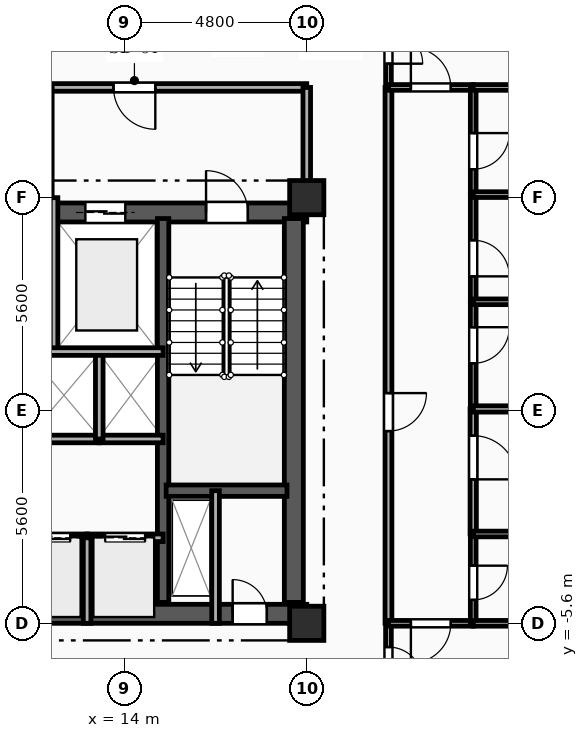
"""IFC4 building model, lengths in metres.
Left out: names, types, materials, properties, quantities, classifications, styles, units other than length and angle.
Written with IfcOpenShell. Run it as: python <this file> out.ifc"""

import sys

from ifc_helpers import new_model, si_unit, direction, frame, frame_2d, origin, origin_2d, place, context, subcontext, project, spatial, rectangle, extrude, element, fill, save


model = new_model("IFC4")
c1 = context("Model", 3, precision=1e-05, world=origin(), true_north=direction((0.0, 1.0)))
c2 = subcontext(c1, "Body", "Model", "MODEL_VIEW")
j1 = project(units=[si_unit("LENGTHUNIT", "METRE"), si_unit("PLANEANGLEUNIT", "RADIAN")], contexts=[c1])
p1 = place(None, origin())
s1 = spatial("IfcSite", under=j1, at=p1, CompositionType="ELEMENT")
p2 = place(p1, origin())
s2 = spatial("IfcBuilding", under=s1, at=p2, CompositionType="ELEMENT")
p3 = place(p2, frame((0.0, 0.0, 141.05)))
s3 = spatial("IfcBuildingStorey", under=s2, at=p3, CompositionType="ELEMENT", Elevation=141.05)
for number, where, z_axis, x_axis in (
    (1, (18.8, -5.6, 0.0), (0.0, 0.0, 1.0), (1.0, 0.0, 0.0)),
    (2, (18.8, 5.6, 0.0), (0.0, 0.0, 1.0), (1.0, 0.0, 0.0)),
):
    element("IfcColumn", number, at=place(p3, frame(where, z_axis=z_axis, x_axis=x_axis)), inside=s3, PredefinedType="COLUMN", context=c2, shape_type="SweptSolid", body=[
        extrude(rectangle(XDim=0.9, YDim=0.9, at=origin_2d()), origin(), (0.0, 0.0, 1.0), 3.35),
    ])
p4 = place(p3, frame((9.2, 5.21, 0.0), z_axis=(0.0, 0.0, 1.0), x_axis=(1.0, 0.0, 0.0)))
e3 = element("IfcWall", 3, at=p4, inside=s3, PredefinedType="SHEAR", context=c2, shape_type="SweptSolid", body=[
    extrude(rectangle(XDim=9.6, YDim=0.5, at=frame_2d((4.8, 0.0))), origin(), (0.0, 0.0, 1.0), 3.04),
])
p5 = place(p4, frame((6.95, 0.0, 0.0)))
e4 = element("IfcOpeningElement", 4, at=p5, cuts=e3, PredefinedType="OPENING", context=c2, shape_type="SweptSolid", body=[
    extrude(rectangle(XDim=1.1, YDim=2.15, at=frame_2d((0.55, 1.075))), frame((0.0, 0.26, 0.0), z_axis=(0.0, -1.0, 0.0), x_axis=(1.0, 0.0, 0.0)), (0.0, 0.0, 1.0), 0.52),
])
p6 = place(p4, frame((3.775, 0.0, 0.0)))
e5 = element("IfcOpeningElement", 5, at=p6, cuts=e3, PredefinedType="OPENING", context=c2, shape_type="SweptSolid", body=[
    extrude(rectangle(XDim=1.05, YDim=2.1, at=frame_2d((0.525, 1.05))), frame((0.0, 0.26, 0.0), z_axis=(0.0, -1.0, 0.0), x_axis=(1.0, 0.0, 0.0)), (0.0, 0.0, 1.0), 0.52),
])
p7 = place(p3, frame((9.2, -5.35, 0.0), z_axis=(0.0, 0.0, 1.0), x_axis=(1.0, 0.0, 0.0)))
e6 = element("IfcWall", 6, at=p7, inside=s3, PredefinedType="SHEAR", context=c2, shape_type="SweptSolid", body=[
    extrude(rectangle(XDim=9.6, YDim=0.5, at=frame_2d((4.8, 0.0))), origin(), (0.0, 0.0, 1.0), 3.04),
])
p8 = place(p7, frame((7.65, 0.0, 0.0)))
e7 = element("IfcOpeningElement", 7, at=p8, cuts=e6, PredefinedType="OPENING", context=c2, shape_type="SweptSolid", body=[
    extrude(rectangle(XDim=0.9, YDim=2.1, at=frame_2d((0.45, 1.05))), frame((0.0, 0.26, 0.0), z_axis=(0.0, -1.0, 0.0), x_axis=(1.0, 0.0, 0.0)), (0.0, 0.0, 1.0), 0.52),
])
p9 = place(p3, frame((18.46, -5.05, 0.0), z_axis=(0.0, 0.0, 1.0), x_axis=(0.0, 1.0, 0.0)))
e8 = element("IfcWall", 8, at=p9, inside=s3, PredefinedType="SHEAR", context=c2, shape_type="SweptSolid", body=[
    extrude(rectangle(XDim=10.1, YDim=0.5, at=frame_2d((5.05, 0.0))), origin(), (0.0, 0.0, 1.0), 3.04),
])
p10 = place(p3, frame((15.02, -5.05, 0.0), z_axis=(0.0, 0.0, 1.0), x_axis=(0.0, 1.0, 0.0)))
e9 = element("IfcWall", 9, at=p10, inside=s3, PredefinedType="SHEAR", context=c2, shape_type="SweptSolid", body=[
    extrude(rectangle(XDim=10.1, YDim=0.3, at=frame_2d((5.05, 0.0))), origin(), (0.0, 0.0, 1.0), 3.04),
])
p11 = place(p3, frame((15.1, -2.11, 0.0), z_axis=(0.0, 0.0, 1.0), x_axis=(1.0, 0.0, 0.0)))
e10 = element("IfcWall", 10, at=p11, inside=s3, PredefinedType="SHEAR", context=c2, shape_type="SweptSolid", body=[
    extrude(rectangle(XDim=3.18, YDim=0.3, at=frame_2d((1.59, 0.0))), origin(), (0.0, 0.0, 1.0), 3.04),
])
p12 = place(p3, frame((16.4, -2.11, 0.0), z_axis=(0.0, 0.0, 1.0), x_axis=(0.0, -1.0, 0.0)))
e11 = element("IfcWall", 11, at=p12, inside=s3, PredefinedType="PARTITIONING", context=c2, shape_type="SweptSolid", body=[
    extrude(rectangle(XDim=3.49, YDim=0.2, at=frame_2d((1.745, 0.0))), origin(), (0.0, 0.0, 1.0), 3.04),
])
p13 = place(p3, frame((12.15, 5.6, 0.0), z_axis=(0.0, 0.0, 1.0), x_axis=(0.0, -1.0, 0.0)))
e12 = element("IfcWall", 12, at=p13, inside=s3, PredefinedType="PARTITIONING", context=c2, shape_type="SweptSolid", body=[
    extrude(rectangle(XDim=4.05, YDim=0.2, at=frame_2d((2.025, 0.0))), origin(), (0.0, 0.0, 1.0), 3.04),
])
p14 = place(p3, frame((18.8, 8.5, 0.0), z_axis=(0.0, 0.0, 1.0), x_axis=(-1.0, 0.0, 0.0)))
e13 = element("IfcWall", 13, at=p14, inside=s3, PredefinedType="PARTITIONING", context=c2, shape_type="SweptSolid", body=[
    extrude(rectangle(XDim=6.8, YDim=0.2, at=frame_2d((3.4, 0.0))), origin(), (0.0, 0.0, 1.0), 3.04),
])
p15 = place(p14, frame((3.985, 0.0, 0.0)))
e14 = element("IfcOpeningElement", 14, at=p15, cuts=e13, PredefinedType="OPENING", context=c2, shape_type="SweptSolid", body=[
    extrude(rectangle(XDim=1.1, YDim=2.15, at=frame_2d((0.55, 1.075))), frame((0.0, 0.11, 0.0), z_axis=(0.0, -1.0, 0.0), x_axis=(1.0, 0.0, 0.0)), (0.0, 0.0, 1.0), 0.22),
])
p16 = place(p3, frame((18.8, 5.6, 0.0), z_axis=(0.0, 0.0, 1.0), x_axis=(0.0, 1.0, 0.0)))
e15 = element("IfcWall", 15, at=p16, inside=s3, PredefinedType="PARTITIONING", context=c2, shape_type="SweptSolid", body=[
    extrude(rectangle(XDim=2.9, YDim=0.2, at=frame_2d((1.45, 0.0))), origin(), (0.0, 0.0, 1.0), 2.525),
])
p17 = place(p3, frame((12.0, 8.5, 0.0), z_axis=(0.0, 0.0, 1.0), x_axis=(0.0, -1.0, 0.0)))
e16 = element("IfcWall", 16, at=p17, inside=s3, PredefinedType="PARTITIONING", context=c2, shape_type="SweptSolid", body=[
    extrude(rectangle(XDim=2.9, YDim=0.2, at=frame_2d((1.45, 0.0))), origin(), (0.0, 0.0, 1.0), 3.04),
])
p18 = place(p3, frame((11.08, -3.35, 0.0), z_axis=(0.0, 0.0, 1.0), x_axis=(1.0, 0.0, 0.0)))
e17 = element("IfcWall", 17, at=p18, inside=s3, PredefinedType="PARTITIONING", context=c2, shape_type="SweptSolid", body=[
    extrude(rectangle(XDim=1.94, YDim=0.2, at=frame_2d((0.97, 0.0))), origin(), (0.0, 0.0, 1.0), 3.04),
])
p19 = place(p18, frame((0.445, 0.0, 0.0)))
e18 = element("IfcOpeningElement", 18, at=p19, cuts=e17, PredefinedType="OPENING", context=c2, shape_type="SweptSolid", body=[
    extrude(rectangle(XDim=1.05, YDim=2.1, at=frame_2d((0.525, 1.05))), frame((0.0, 0.11, 0.0), z_axis=(0.0, -1.0, 0.0), x_axis=(1.0, 0.0, 0.0)), (0.0, 0.0, 1.0), 0.22),
])
p20 = place(p3, frame((13.02, -3.35, 0.0), z_axis=(0.0, 0.0, 1.0), x_axis=(1.0, 0.0, 0.0)))
e19 = element("IfcWall", 19, at=p20, inside=s3, PredefinedType="PARTITIONING", context=c2, shape_type="SweptSolid", body=[
    extrude(rectangle(XDim=2.0, YDim=0.2, at=frame_2d((1.0, 0.0))), origin(), (0.0, 0.0, 1.0), 3.04),
])
p21 = place(p20, frame((0.475, 0.0, 0.0)))
e20 = element("IfcOpeningElement", 20, at=p21, cuts=e19, PredefinedType="OPENING", context=c2, shape_type="SweptSolid", body=[
    extrude(rectangle(XDim=1.05, YDim=2.1, at=frame_2d((0.525, 1.05))), frame((0.0, 0.11, 0.0), z_axis=(0.0, -1.0, 0.0), x_axis=(1.0, 0.0, 0.0)), (0.0, 0.0, 1.0), 0.22),
])
p22 = place(p3, frame((13.34, -0.75, 0.0), z_axis=(0.0, 0.0, 1.0), x_axis=(-1.0, 0.0, 0.0)))
e21 = element("IfcWall", 21, at=p22, inside=s3, PredefinedType="PARTITIONING", context=c2, shape_type="SweptSolid", body=[
    extrude(rectangle(XDim=1.88, YDim=0.2, at=frame_2d((0.94, 0.0))), origin(), (0.0, 0.0, 1.0), 3.04),
])
p23 = place(p3, frame((15.02, -0.75, 0.0), z_axis=(0.0, 0.0, 1.0), x_axis=(-1.0, 0.0, 0.0)))
e22 = element("IfcWall", 22, at=p23, inside=s3, PredefinedType="PARTITIONING", context=c2, shape_type="SweptSolid", body=[
    extrude(rectangle(XDim=1.68, YDim=0.2, at=frame_2d((0.84, 0.0))), origin(), (0.0, 0.0, 1.0), 3.04),
])
p24 = place(p3, frame((13.02, -5.6, 0.0), z_axis=(0.0, 0.0, 1.0), x_axis=(0.0, 1.0, 0.0)))
e23 = element("IfcWall", 23, at=p24, inside=s3, PredefinedType="PARTITIONING", context=c2, shape_type="SweptSolid", body=[
    extrude(rectangle(XDim=2.25, YDim=0.2, at=frame_2d((1.125, 0.0))), origin(), (0.0, 0.0, 1.0), 3.04),
])
p25 = place(p3, frame((13.34, -0.75, 0.0), z_axis=(0.0, 0.0, 1.0), x_axis=(0.0, 1.0, 0.0)))
e24 = element("IfcWall", 24, at=p25, inside=s3, PredefinedType="PARTITIONING", context=c2, shape_type="SweptSolid", body=[
    extrude(rectangle(XDim=2.3, YDim=0.2, at=frame_2d((1.15, 0.0))), origin(), (0.0, 0.0, 1.0), 3.04),
])
p26 = place(p3, frame((20.95, 10.65, 0.0), z_axis=(0.0, 0.0, 1.0), x_axis=(0.0, -1.0, 0.0)))
e25 = element("IfcWall", 25, at=p26, inside=s3, PredefinedType="PARTITIONING", context=c2, shape_type="SweptSolid", body=[
    extrude(rectangle(XDim=2.15, YDim=0.15, at=frame_2d((1.075, 0.0))), origin(), (0.0, 0.0, 1.0), 3.04),
])
p27 = place(p26, frame((0.625, 0.0, 0.0)))
e26 = element("IfcOpeningElement", 26, at=p27, cuts=e25, PredefinedType="OPENING", context=c2, shape_type="SweptSolid", body=[
    extrude(rectangle(XDim=0.9, YDim=2.1, at=frame_2d((0.45, 1.05))), frame((0.0, 0.085, 0.0), z_axis=(0.0, -1.0, 0.0), x_axis=(1.0, 0.0, 0.0)), (0.0, 0.0, 1.0), 0.17),
])
p28 = place(p3, frame((20.95, -5.6, 0.0), z_axis=(0.0, 0.0, 1.0), x_axis=(0.0, -1.0, 0.0)))
e27 = element("IfcWall", 27, at=p28, inside=s3, PredefinedType="PARTITIONING", context=c2, shape_type="SweptSolid", body=[
    extrude(rectangle(XDim=2.15, YDim=0.15, at=frame_2d((1.075, 0.0))), origin(), (0.0, 0.0, 1.0), 3.04),
])
p29 = place(p28, frame((0.625, 0.0, 0.0)))
e28 = element("IfcOpeningElement", 28, at=p29, cuts=e27, PredefinedType="OPENING", context=c2, shape_type="SweptSolid", body=[
    extrude(rectangle(XDim=0.9, YDim=2.1, at=frame_2d((0.45, 1.05))), frame((0.0, 0.085, 0.0), z_axis=(0.0, -1.0, 0.0), x_axis=(1.0, 0.0, 0.0)), (0.0, 0.0, 1.0), 0.17),
])
p30 = place(p3, frame((20.95, 8.5, 0.0), z_axis=(0.0, 0.0, 1.0), x_axis=(0.0, -1.0, 0.0)))
e29 = element("IfcWall", 29, at=p30, inside=s3, PredefinedType="PARTITIONING", context=c2, shape_type="SweptSolid", body=[
    extrude(rectangle(XDim=14.1, YDim=0.18, at=frame_2d((7.05, 0.0))), origin(), (0.0, 0.0, 1.0), 3.04),
])
p31 = place(p30, frame((8.042, 0.0, 0.0)))
e30 = element("IfcOpeningElement", 30, at=p31, cuts=e29, PredefinedType="OPENING", context=c2, shape_type="SweptSolid", body=[
    extrude(rectangle(XDim=1.0, YDim=2.15, at=frame_2d((0.5, 1.075))), frame((0.0, 0.1, 0.0), z_axis=(0.0, -1.0, 0.0), x_axis=(1.0, 0.0, 0.0)), (0.0, 0.0, 1.0), 0.2),
])
p32 = place(p3, frame((20.95, 8.5, 0.0), z_axis=(0.0, 0.0, 1.0), x_axis=(1.0, 0.0, 0.0)))
e31 = element("IfcWall", 31, at=p32, inside=s3, PredefinedType="PARTITIONING", context=c2, shape_type="SweptSolid", body=[
    extrude(rectangle(XDim=2.23, YDim=0.15, at=frame_2d((1.115, 0.0))), origin(), (0.0, 0.0, 1.0), 3.04),
])
p33 = place(p32, frame((0.59, 0.0, 0.0)))
e32 = element("IfcOpeningElement", 32, at=p33, cuts=e31, PredefinedType="OPENING", context=c2, shape_type="SweptSolid", body=[
    extrude(rectangle(XDim=1.05, YDim=2.15, at=frame_2d((0.525, 1.075))), frame((0.0, 0.085, 0.0), z_axis=(0.0, -1.0, 0.0), x_axis=(1.0, 0.0, 0.0)), (0.0, 0.0, 1.0), 0.17),
])
p34 = place(p3, frame((23.18, -5.6, 0.0), z_axis=(0.0, 0.0, 1.0), x_axis=(-1.0, 0.0, 0.0)))
e33 = element("IfcWall", 33, at=p34, inside=s3, PredefinedType="PARTITIONING", context=c2, shape_type="SweptSolid", body=[
    extrude(rectangle(XDim=2.23, YDim=0.15, at=frame_2d((1.115, 0.0))), origin(), (0.0, 0.0, 1.0), 3.04),
])
p35 = place(p34, frame((0.59, 0.0, 0.0)))
e34 = element("IfcOpeningElement", 34, at=p35, cuts=e33, PredefinedType="OPENING", context=c2, shape_type="SweptSolid", body=[
    extrude(rectangle(XDim=1.05, YDim=2.15, at=frame_2d((0.525, 1.075))), frame((0.0, 0.085, 0.0), z_axis=(0.0, -1.0, 0.0), x_axis=(1.0, 0.0, 0.0)), (0.0, 0.0, 1.0), 0.17),
])
p36 = place(p3, frame((23.18, -3.25, 0.0), z_axis=(0.0, 0.0, 1.0), x_axis=(0.0, -1.0, 0.0)))
e35 = element("IfcWall", 35, at=p36, inside=s3, PredefinedType="PLUMBINGWALL", context=c2, shape_type="SweptSolid", body=[
    extrude(rectangle(XDim=2.35, YDim=0.15, at=frame_2d((1.175, 0.0))), origin(), (0.0, 0.0, 1.0), 3.04),
])
p37 = place(p36, frame((0.834, 0.0, 0.0)))
e36 = element("IfcOpeningElement", 36, at=p37, cuts=e35, PredefinedType="OPENING", context=c2, shape_type="SweptSolid", body=[
    extrude(rectangle(XDim=0.9, YDim=2.1, at=frame_2d((0.45, 1.05))), frame((0.0, 0.085, 0.0), z_axis=(0.0, -1.0, 0.0), x_axis=(1.0, 0.0, 0.0)), (0.0, 0.0, 1.0), 0.17),
])
p38 = place(p3, frame((23.18, 0.04, 0.0), z_axis=(0.0, 0.0, 1.0), x_axis=(0.0, -1.0, 0.0)))
e37 = element("IfcWall", 37, at=p38, inside=s3, PredefinedType="PARTITIONING", context=c2, shape_type="SweptSolid", body=[
    extrude(rectangle(XDim=3.29, YDim=0.165, at=frame_2d((1.645, 0.0))), origin(), (0.0, 0.0, 1.0), 3.04),
])
p39 = place(p38, frame((0.702, 0.0, 0.0)))
e38 = element("IfcOpeningElement", 38, at=p39, cuts=e37, PredefinedType="OPENING", context=c2, shape_type="SweptSolid", body=[
    extrude(rectangle(XDim=1.15, YDim=2.15, at=frame_2d((0.575, 1.075))), frame((0.0, 0.093, 0.0), z_axis=(0.0, -1.0, 0.0), x_axis=(1.0, 0.0, 0.0)), (0.0, 0.0, 1.0), 0.185),
])
p40 = place(p3, frame((23.18, 2.86, 0.0), z_axis=(0.0, 0.0, 1.0), x_axis=(0.0, -1.0, 0.0)))
e39 = element("IfcWall", 39, at=p40, inside=s3, PredefinedType="PARTITIONING", context=c2, shape_type="SweptSolid", body=[
    extrude(rectangle(XDim=2.82, YDim=0.15, at=frame_2d((1.41, 0.0))), origin(), (0.0, 0.0, 1.0), 3.04),
])
p41 = place(p40, frame((0.669, 0.0, 0.0)))
e40 = element("IfcOpeningElement", 40, at=p41, cuts=e39, PredefinedType="OPENING", context=c2, shape_type="SweptSolid", body=[
    extrude(rectangle(XDim=0.95, YDim=2.1, at=frame_2d((0.475, 1.05))), frame((0.0, 0.085, 0.0), z_axis=(0.0, -1.0, 0.0), x_axis=(1.0, 0.0, 0.0)), (0.0, 0.0, 1.0), 0.17),
])
p42 = place(p3, frame((23.18, 5.68, 0.0), z_axis=(0.0, 0.0, 1.0), x_axis=(0.0, -1.0, 0.0)))
e41 = element("IfcWall", 41, at=p42, inside=s3, PredefinedType="PARTITIONING", context=c2, shape_type="SweptSolid", body=[
    extrude(rectangle(XDim=2.82, YDim=0.15, at=frame_2d((1.41, 0.0))), origin(), (0.0, 0.0, 1.0), 3.04),
])
p43 = place(p42, frame((1.201, 0.0, 0.0)))
e42 = element("IfcOpeningElement", 42, at=p43, cuts=e41, PredefinedType="OPENING", context=c2, shape_type="SweptSolid", body=[
    extrude(rectangle(XDim=0.95, YDim=2.1, at=frame_2d((0.475, 1.05))), frame((0.0, 0.085, 0.0), z_axis=(0.0, -1.0, 0.0), x_axis=(1.0, 0.0, 0.0)), (0.0, 0.0, 1.0), 0.17),
])
p44 = place(p3, frame((23.18, 8.5, 0.0), z_axis=(0.0, 0.0, 1.0), x_axis=(0.0, -1.0, 0.0)))
e43 = element("IfcWall", 43, at=p44, inside=s3, PredefinedType="PARTITIONING", context=c2, shape_type="SweptSolid", body=[
    extrude(rectangle(XDim=2.82, YDim=0.15, at=frame_2d((1.41, 0.0))), origin(), (0.0, 0.0, 1.0), 3.04),
])
p45 = place(p44, frame((1.201, 0.0, 0.0)))
e44 = element("IfcOpeningElement", 44, at=p45, cuts=e43, PredefinedType="OPENING", context=c2, shape_type="SweptSolid", body=[
    extrude(rectangle(XDim=0.95, YDim=2.1, at=frame_2d((0.475, 1.05))), frame((0.0, 0.085, 0.0), z_axis=(0.0, -1.0, 0.0), x_axis=(1.0, 0.0, 0.0)), (0.0, 0.0, 1.0), 0.17),
])
p46 = place(p3, frame((27.0, 8.5, 0.0), z_axis=(0.0, 0.0, 1.0), x_axis=(-1.0, 0.0, 0.0)))
e45 = element("IfcWall", 45, at=p46, inside=s3, PredefinedType="PARTITIONING", context=c2, shape_type="SweptSolid", body=[
    extrude(rectangle(XDim=3.82, YDim=0.15, at=frame_2d((1.91, 0.0))), origin(), (0.0, 0.0, 1.0), 3.04),
])
for number, where, z_axis, x_axis in (
    (46, (23.18, -5.6, 0.0), (0.0, 0.0, 1.0), (1.0, 0.0, 0.0)),
    (47, (23.18, -3.25, 0.0), (0.0, 0.0, 1.0), (1.0, 0.0, 0.0)),
):
    element("IfcWall", number, at=place(p3, frame(where, z_axis=z_axis, x_axis=x_axis)), inside=s3, PredefinedType="PLUMBINGWALL", context=c2, shape_type="SweptSolid", body=[
        extrude(rectangle(XDim=3.82, YDim=0.15, at=frame_2d((1.91, 0.0))), origin(), (0.0, 0.0, 1.0), 3.04),
    ])
p47 = place(p3, frame((23.18, 0.04, 0.0), z_axis=(0.0, 0.0, 1.0), x_axis=(1.0, 0.0, 0.0)))
e48 = element("IfcWall", 48, at=p47, inside=s3, PredefinedType="PARTITIONING", context=c2, shape_type="SweptSolid", body=[
    extrude(rectangle(XDim=3.82, YDim=0.165, at=frame_2d((1.91, 0.0))), origin(), (0.0, 0.0, 1.0), 3.04),
])
for number, where, z_axis, x_axis in (
    (49, (23.18, 2.86, 0.0), (0.0, 0.0, 1.0), (1.0, 0.0, 0.0)),
    (50, (23.18, 5.68, 0.0), (0.0, 0.0, 1.0), (1.0, 0.0, 0.0)),
):
    element("IfcWall", number, at=place(p3, frame(where, z_axis=z_axis, x_axis=x_axis)), inside=s3, PredefinedType="PARTITIONING", context=c2, shape_type="SweptSolid", body=[
        extrude(rectangle(XDim=3.82, YDim=0.15, at=frame_2d((1.91, 0.0))), origin(), (0.0, 0.0, 1.0), 3.04),
    ])
p48 = place(p3, frame((9.2, 1.55, 0.0), z_axis=(0.0, 0.0, 1.0), x_axis=(1.0, 0.0, 0.0)))
e51 = element("IfcWall", 51, at=p48, inside=s3, PredefinedType="PARTITIONING", context=c2, shape_type="SweptSolid", body=[
    extrude(rectangle(XDim=5.82, YDim=0.2, at=frame_2d((2.91, 0.0))), origin(), (0.0, 0.0, 1.0), 3.04),
])
p49 = place(p5, origin())
e52 = element("IfcDoor", 52, at=p49, inside=s3, OperationType="SINGLE_SWING_LEFT", PredefinedType="DOOR", context=c2, shape_type="SweptSolid", body=[
    extrude(rectangle(XDim=1.1, YDim=2.15, at=frame_2d((0.55, 1.075))), frame((0.0, 0.025, 0.0), z_axis=(0.0, -1.0, 0.0), x_axis=(1.0, 0.0, 0.0)), (0.0, 0.0, 1.0), 0.05),
])
fill(e4, e52)
p50 = place(p6, origin())
e53 = element("IfcDoor", 53, at=p50, inside=s3, OperationType="DOUBLE_DOOR_SLIDING", PredefinedType="DOOR", context=c2, shape_type="SweptSolid", body=[
    extrude(rectangle(XDim=1.05, YDim=2.1, at=frame_2d((0.525, 1.05))), frame((0.0, 0.025, 0.0), z_axis=(0.0, -1.0, 0.0), x_axis=(1.0, 0.0, 0.0)), (0.0, 0.0, 1.0), 0.05),
])
fill(e5, e53)
p51 = place(p8, origin())
e54 = element("IfcDoor", 54, at=p51, inside=s3, OperationType="SINGLE_SWING_LEFT", PredefinedType="DOOR", context=c2, shape_type="SweptSolid", body=[
    extrude(rectangle(XDim=0.9, YDim=2.1, at=frame_2d((0.45, 1.05))), frame((0.0, 0.025, 0.0), z_axis=(0.0, -1.0, 0.0), x_axis=(1.0, 0.0, 0.0)), (0.0, 0.0, 1.0), 0.05),
])
fill(e7, e54)
p52 = place(p15, origin())
e55 = element("IfcDoor", 55, at=p52, inside=s3, OperationType="SINGLE_SWING_LEFT", PredefinedType="DOOR", context=c2, shape_type="SweptSolid", body=[
    extrude(rectangle(XDim=1.1, YDim=2.15, at=frame_2d((0.55, 1.075))), frame((0.0, 0.025, 0.0), z_axis=(0.0, -1.0, 0.0), x_axis=(1.0, 0.0, 0.0)), (0.0, 0.0, 1.0), 0.05),
])
fill(e14, e55)
p53 = place(p19, origin())
e56 = element("IfcDoor", 56, at=p53, inside=s3, OperationType="DOUBLE_DOOR_SLIDING", PredefinedType="DOOR", context=c2, shape_type="SweptSolid", body=[
    extrude(rectangle(XDim=1.05, YDim=2.1, at=frame_2d((0.525, 1.05))), frame((0.0, 0.025, 0.0), z_axis=(0.0, -1.0, 0.0), x_axis=(1.0, 0.0, 0.0)), (0.0, 0.0, 1.0), 0.05),
])
fill(e18, e56)
p54 = place(p21, origin())
e57 = element("IfcDoor", 57, at=p54, inside=s3, OperationType="DOUBLE_DOOR_SLIDING", PredefinedType="DOOR", context=c2, shape_type="SweptSolid", body=[
    extrude(rectangle(XDim=1.05, YDim=2.1, at=frame_2d((0.525, 1.05))), frame((0.0, 0.025, 0.0), z_axis=(0.0, -1.0, 0.0), x_axis=(1.0, 0.0, 0.0)), (0.0, 0.0, 1.0), 0.05),
])
fill(e20, e57)
p55 = place(p27, origin())
e58 = element("IfcDoor", 58, at=p55, inside=s3, OperationType="SINGLE_SWING_RIGHT", PredefinedType="DOOR", context=c2, shape_type="SweptSolid", body=[
    extrude(rectangle(XDim=0.9, YDim=2.1, at=frame_2d((0.45, 1.05))), frame((0.0, 0.025, 0.0), z_axis=(0.0, -1.0, 0.0), x_axis=(1.0, 0.0, 0.0)), (0.0, 0.0, 1.0), 0.05),
])
fill(e26, e58)
p56 = place(p29, origin())
e59 = element("IfcDoor", 59, at=p56, inside=s3, OperationType="SINGLE_SWING_RIGHT", PredefinedType="DOOR", context=c2, shape_type="SweptSolid", body=[
    extrude(rectangle(XDim=0.9, YDim=2.1, at=frame_2d((0.45, 1.05))), frame((0.0, 0.025, 0.0), z_axis=(0.0, -1.0, 0.0), x_axis=(1.0, 0.0, 0.0)), (0.0, 0.0, 1.0), 0.05),
])
fill(e28, e59)
p57 = place(p31, origin())
e60 = element("IfcDoor", 60, at=p57, inside=s3, OperationType="SINGLE_SWING_LEFT", PredefinedType="DOOR", context=c2, shape_type="SweptSolid", body=[
    extrude(rectangle(XDim=1.0, YDim=2.15, at=frame_2d((0.5, 1.075))), frame((0.0, 0.025, 0.0), z_axis=(0.0, -1.0, 0.0), x_axis=(1.0, 0.0, 0.0)), (0.0, 0.0, 1.0), 0.05),
])
fill(e30, e60)
p58 = place(p33, origin())
e61 = element("IfcDoor", 61, at=p58, inside=s3, OperationType="SINGLE_SWING_LEFT", PredefinedType="DOOR", context=c2, shape_type="SweptSolid", body=[
    extrude(rectangle(XDim=1.05, YDim=2.15, at=frame_2d((0.525, 1.075))), frame((0.0, 0.025, 0.0), z_axis=(0.0, -1.0, 0.0), x_axis=(1.0, 0.0, 0.0)), (0.0, 0.0, 1.0), 0.05),
])
fill(e32, e61)
p59 = place(p35, origin())
e62 = element("IfcDoor", 62, at=p59, inside=s3, OperationType="SINGLE_SWING_RIGHT", PredefinedType="DOOR", context=c2, shape_type="SweptSolid", body=[
    extrude(rectangle(XDim=1.05, YDim=2.15, at=frame_2d((0.525, 1.075))), frame((0.0, 0.025, 0.0), z_axis=(0.0, -1.0, 0.0), x_axis=(1.0, 0.0, 0.0)), (0.0, 0.0, 1.0), 0.05),
])
fill(e34, e62)
p60 = place(p37, origin())
e63 = element("IfcDoor", 63, at=p60, inside=s3, OperationType="SINGLE_SWING_LEFT", PredefinedType="DOOR", context=c2, shape_type="SweptSolid", body=[
    extrude(rectangle(XDim=0.9, YDim=2.1, at=frame_2d((0.45, 1.05))), frame((0.0, 0.025, 0.0), z_axis=(0.0, -1.0, 0.0), x_axis=(1.0, 0.0, 0.0)), (0.0, 0.0, 1.0), 0.05),
])
fill(e36, e63)
p61 = place(p39, origin())
e64 = element("IfcDoor", 64, at=p61, inside=s3, OperationType="SINGLE_SWING_RIGHT", PredefinedType="DOOR", context=c2, shape_type="SweptSolid", body=[
    extrude(rectangle(XDim=1.15, YDim=2.15, at=frame_2d((0.575, 1.075))), frame((0.0, 0.025, 0.0), z_axis=(0.0, -1.0, 0.0), x_axis=(1.0, 0.0, 0.0)), (0.0, 0.0, 1.0), 0.05),
])
fill(e38, e64)
p62 = place(p41, origin())
e65 = element("IfcDoor", 65, at=p62, inside=s3, OperationType="SINGLE_SWING_LEFT", PredefinedType="DOOR", context=c2, shape_type="SweptSolid", body=[
    extrude(rectangle(XDim=0.95, YDim=2.1, at=frame_2d((0.475, 1.05))), frame((0.0, 0.025, 0.0), z_axis=(0.0, -1.0, 0.0), x_axis=(1.0, 0.0, 0.0)), (0.0, 0.0, 1.0), 0.05),
])
fill(e40, e65)
p63 = place(p43, origin())
e66 = element("IfcDoor", 66, at=p63, inside=s3, OperationType="SINGLE_SWING_RIGHT", PredefinedType="DOOR", context=c2, shape_type="SweptSolid", body=[
    extrude(rectangle(XDim=0.95, YDim=2.1, at=frame_2d((0.475, 1.05))), frame((0.0, 0.025, 0.0), z_axis=(0.0, -1.0, 0.0), x_axis=(1.0, 0.0, 0.0)), (0.0, 0.0, 1.0), 0.05),
])
fill(e42, e66)
p64 = place(p45, origin())
e67 = element("IfcDoor", 67, at=p64, inside=s3, OperationType="SINGLE_SWING_LEFT", PredefinedType="DOOR", context=c2, shape_type="SweptSolid", body=[
    extrude(rectangle(XDim=0.95, YDim=2.1, at=frame_2d((0.475, 1.05))), frame((0.0, 0.025, 0.0), z_axis=(0.0, -1.0, 0.0), x_axis=(1.0, 0.0, 0.0)), (0.0, 0.0, 1.0), 0.05),
])
fill(e44, e67)
save(model, sys.argv[1])
